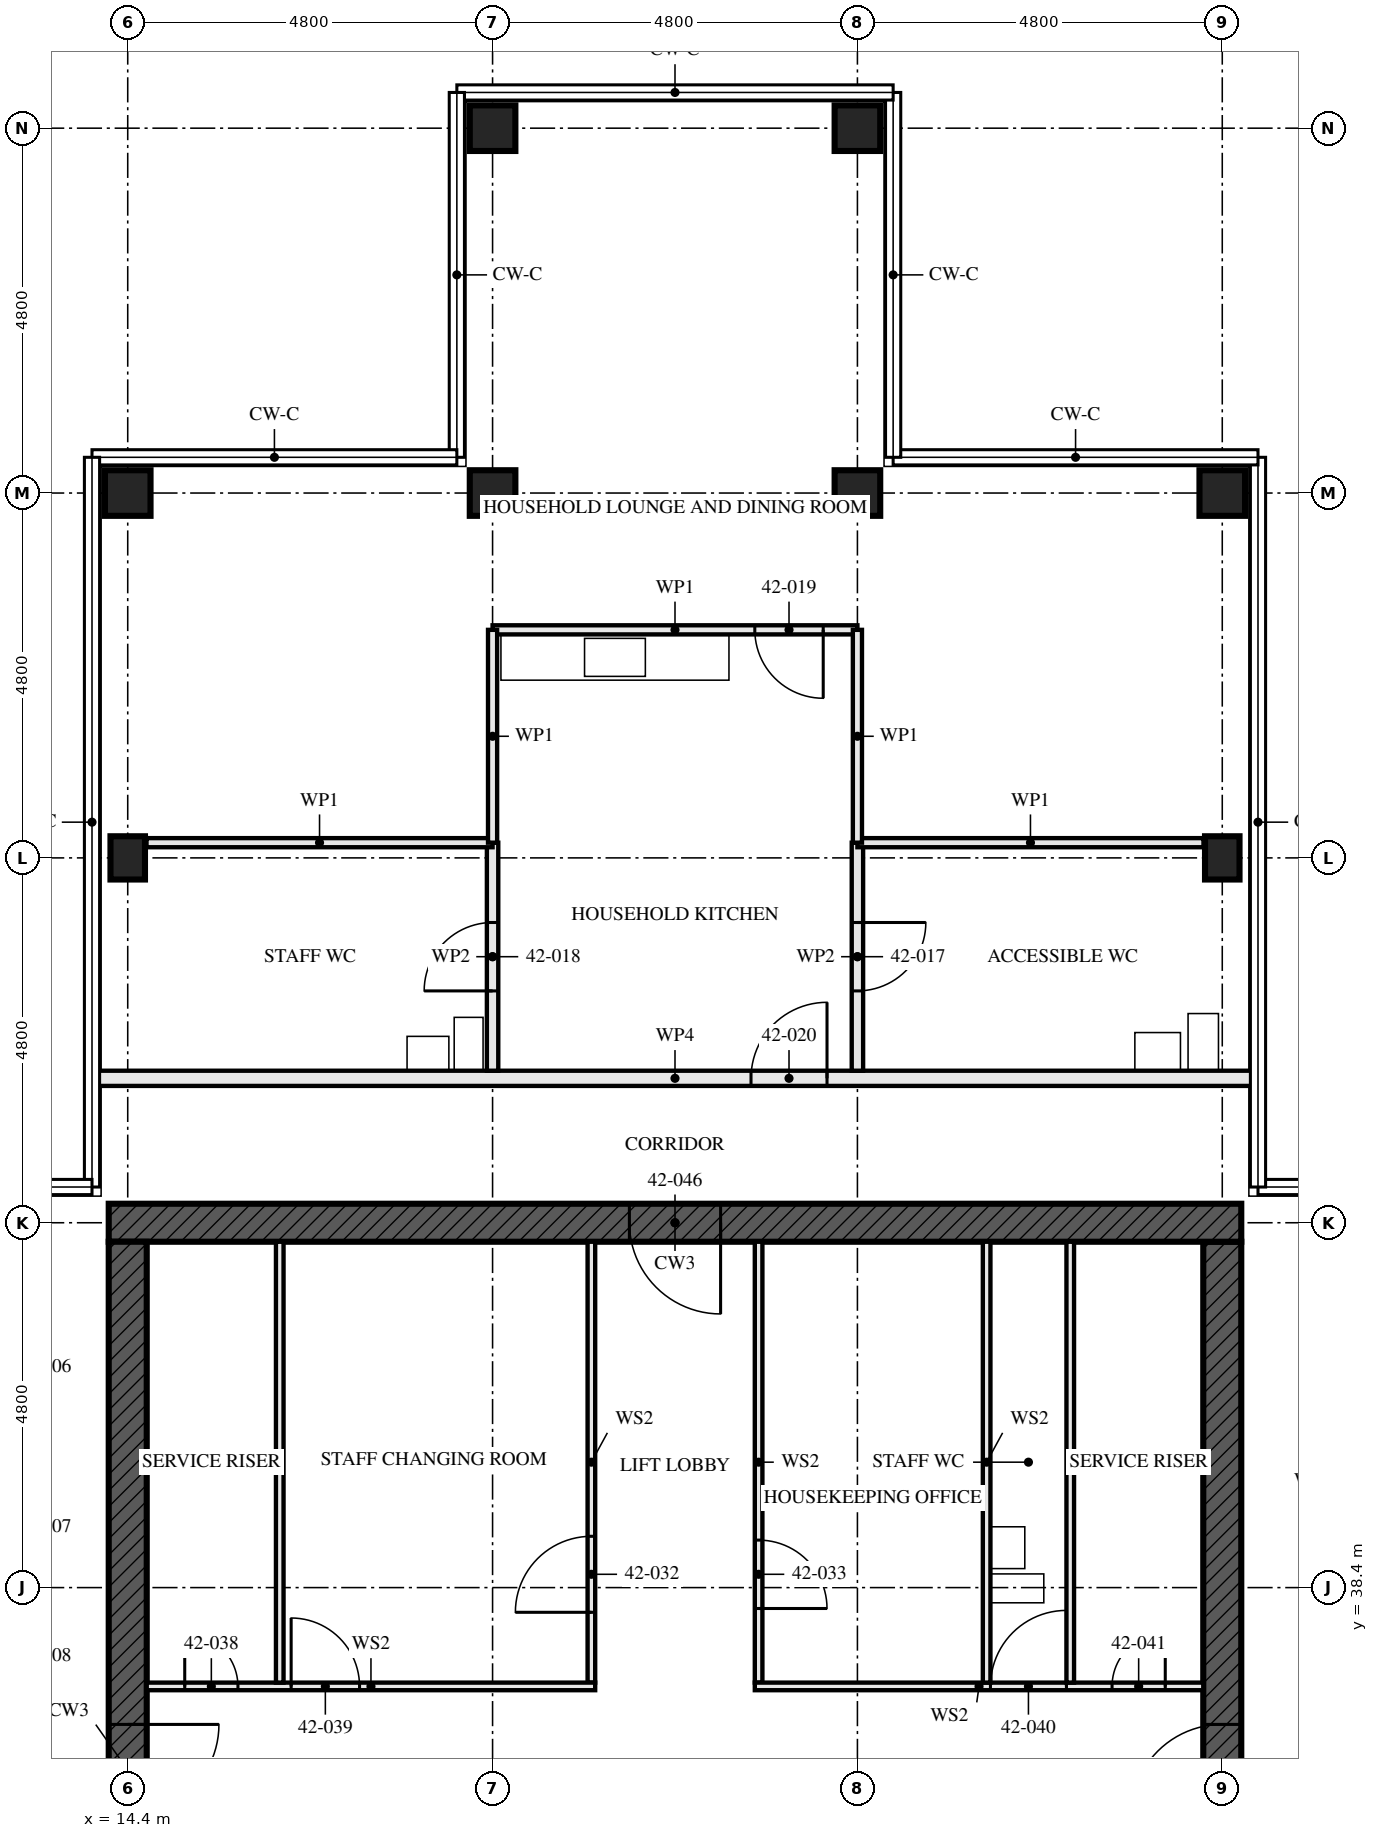
"""IFC4 building model, lengths in metres.
Left out: names, types, materials, properties, quantities, classifications, styles, units other than length and angle.
Written with IfcOpenShell. Run it as: python <this file> out.ifc"""

import sys

from ifc_helpers import new_model, si_unit, direction, frame, frame_2d, origin, origin_2d, place, context, subcontext, project, spatial, rectangle, hollow_rectangle, i_section, extrude, element, fill, save


model = new_model("IFC4")
c1 = context("Model", 3, precision=1e-05, world=origin(), true_north=direction((0.0, 1.0)))
c2 = subcontext(c1, "Body", "Model", "MODEL_VIEW")
j1 = project(units=[si_unit("LENGTHUNIT", "METRE"), si_unit("PLANEANGLEUNIT", "RADIAN")], contexts=[c1])
p1 = place(None, origin())
s1 = spatial("IfcSite", under=j1, at=p1, CompositionType="ELEMENT")
p2 = place(p1, origin())
s2 = spatial("IfcBuilding", under=s1, at=p2, CompositionType="ELEMENT")
p3 = place(p2, frame((0.0, 0.0, 155.0)))
s3 = spatial("IfcBuildingStorey", under=s2, at=p3, CompositionType="ELEMENT", Elevation=155.0)
p4 = place(p3, frame((14.4, 48.0, 0.0), z_axis=(0.0, 0.0, 1.0), x_axis=(1.0, 0.0, 0.0)))
e1 = element("IfcColumn", 1, at=p4, inside=s3, PredefinedType="COLUMN", context=c2, shape_type="SweptSolid", body=[
    extrude(i_section(OverallWidth=0.454, OverallDepth=0.569, WebThickness=0.078, FlangeThickness=0.125, FilletRadius=0.015, at=origin_2d()), origin(), (0.0, 0.0, 1.0), 3.5),
])
for number, where, z_axis, x_axis in (
    (2, (14.4, 52.8, 0.0), (0.0, 0.0, 1.0), (0.0, 1.0, 0.0)),
    (3, (19.2, 52.8, 0.0), (0.0, 0.0, 1.0), (0.0, 1.0, 0.0)),
    (4, (19.2, 57.6, 0.0), (0.0, 0.0, 1.0), (0.0, 1.0, 0.0)),
    (5, (24.0, 52.8, 0.0), (0.0, 0.0, 1.0), (0.0, 1.0, 0.0)),
    (6, (24.0, 57.6, 0.0), (0.0, 0.0, 1.0), (0.0, 1.0, 0.0)),
):
    element("IfcColumn", number, at=place(p3, frame(where, z_axis=z_axis, x_axis=x_axis)), inside=s3, PredefinedType="COLUMN", context=c2, shape_type="SweptSolid", body=[
        extrude(hollow_rectangle(XDim=0.6, YDim=0.6, WallThickness=0.05, at=origin_2d()), origin(), (0.0, 0.0, 1.0), 3.5),
    ])
p5 = place(p3, frame((28.8, 48.0, 0.0), z_axis=(0.0, 0.0, 1.0), x_axis=(1.0, 0.0, 0.0)))
e7 = element("IfcColumn", 7, at=p5, inside=s3, PredefinedType="COLUMN", context=c2, shape_type="SweptSolid", body=[
    extrude(i_section(OverallWidth=0.454, OverallDepth=0.569, WebThickness=0.078, FlangeThickness=0.125, FilletRadius=0.015, at=origin_2d()), origin(), (0.0, 0.0, 1.0), 3.5),
])
p6 = place(p3, frame((28.8, 52.8, 0.0), z_axis=(0.0, 0.0, 1.0), x_axis=(0.0, 1.0, 0.0)))
e8 = element("IfcColumn", 8, at=p6, inside=s3, PredefinedType="COLUMN", context=c2, shape_type="SweptSolid", body=[
    extrude(hollow_rectangle(XDim=0.6, YDim=0.6, WallThickness=0.05, at=origin_2d()), origin(), (0.0, 0.0, 1.0), 3.5),
])
p7 = place(p3, frame((29.05, 43.2, -0.17), z_axis=(0.0, 0.0, 1.0), x_axis=(-1.0, 0.0, 0.0)))
e9 = element("IfcWall", 9, at=p7, inside=s3, PredefinedType="SHEAR", context=c2, shape_type="SweptSolid", body=[
    extrude(rectangle(XDim=14.9, YDim=0.5, at=frame_2d((7.45, 0.0))), origin(), (0.0, 0.0, 1.0), 3.5),
])
p8 = place(p7, frame((6.85, 0.0, 0.17)))
e10 = element("IfcOpeningElement", 10, at=p8, cuts=e9, PredefinedType="OPENING", context=c2, shape_type="SweptSolid", body=[
    extrude(rectangle(XDim=1.2, YDim=2.1, at=frame_2d((0.6, 1.05))), frame((0.0, 0.26, 0.0), z_axis=(0.0, -1.0, 0.0), x_axis=(1.0, 0.0, 0.0)), (0.0, 0.0, 1.0), 0.521),
])
p9 = place(p3, frame((14.4, 42.95, -0.17), z_axis=(0.0, 0.0, 1.0), x_axis=(0.0, -1.0, 0.0)))
e11 = element("IfcWall", 11, at=p9, inside=s3, PredefinedType="SHEAR", context=c2, shape_type="SweptSolid", body=[
    extrude(rectangle(XDim=13.9, YDim=0.5, at=frame_2d((6.95, 0.0))), origin(), (0.0, 0.0, 1.0), 3.5),
])
p10 = place(p9, frame((6.35, 0.0, 0.17)))
e12 = element("IfcOpeningElement", 12, at=p10, cuts=e11, PredefinedType="OPENING", context=c2, shape_type="SweptSolid", body=[
    extrude(rectangle(XDim=1.2, YDim=2.1, at=frame_2d((0.6, 1.05))), frame((0.0, 0.26, 0.0), z_axis=(0.0, -1.0, 0.0), x_axis=(1.0, 0.0, 0.0)), (0.0, 0.0, 1.0), 0.521),
])
p11 = place(p3, frame((28.8, 29.05, -0.17), z_axis=(0.0, 0.0, 1.0), x_axis=(0.0, 1.0, 0.0)))
e13 = element("IfcWall", 13, at=p11, inside=s3, PredefinedType="SHEAR", context=c2, shape_type="SweptSolid", body=[
    extrude(rectangle(XDim=13.9, YDim=0.5, at=frame_2d((6.95, 0.0))), origin(), (0.0, 0.0, 1.0), 3.5),
])
p12 = place(p11, frame((6.35, 0.0, 0.17)))
e14 = element("IfcOpeningElement", 14, at=p12, cuts=e13, PredefinedType="OPENING", context=c2, shape_type="SweptSolid", body=[
    extrude(rectangle(XDim=1.2, YDim=2.1, at=frame_2d((0.6, 1.05))), frame((0.0, 0.26, 0.0), z_axis=(0.0, -1.0, 0.0), x_axis=(1.0, 0.0, 0.0)), (0.0, 0.0, 1.0), 0.521),
])
p13 = place(p3, frame((24.0, 48.2, 0.0), z_axis=(0.0, 0.0, 1.0), x_axis=(0.0, -1.0, 0.0)))
e15 = element("IfcWall", 15, at=p13, inside=s3, PredefinedType="PARTITIONING", context=c2, shape_type="SweptSolid", body=[
    extrude(rectangle(XDim=3.0, YDim=0.15, at=frame_2d((1.5, 0.0))), origin(), (0.0, 0.0, 1.0), 2.55),
])
p14 = place(p13, frame((1.05, 0.0, 0.0)))
e16 = element("IfcOpeningElement", 16, at=p14, cuts=e15, PredefinedType="OPENING", context=c2, shape_type="SweptSolid", body=[
    extrude(rectangle(XDim=0.9, YDim=2.1, at=frame_2d((0.45, 1.05))), frame((0.0, 0.085, 0.0), z_axis=(0.0, -1.0, 0.0), x_axis=(1.0, 0.0, 0.0)), (0.0, 0.0, 1.0), 0.171),
])
p15 = place(p3, frame((19.2, 48.2, 0.0), z_axis=(0.0, 0.0, 1.0), x_axis=(0.0, -1.0, 0.0)))
e17 = element("IfcWall", 17, at=p15, inside=s3, PredefinedType="PARTITIONING", context=c2, shape_type="SweptSolid", body=[
    extrude(rectangle(XDim=3.0, YDim=0.15, at=frame_2d((1.5, 0.0))), origin(), (0.0, 0.0, 1.0), 2.55),
])
p16 = place(p15, frame((1.05, 0.0, 0.0)))
e18 = element("IfcOpeningElement", 18, at=p16, cuts=e17, PredefinedType="OPENING", context=c2, shape_type="SweptSolid", body=[
    extrude(rectangle(XDim=0.9, YDim=2.1, at=frame_2d((0.45, 1.05))), frame((0.0, 0.085, 0.0), z_axis=(0.0, -1.0, 0.0), x_axis=(1.0, 0.0, 0.0)), (0.0, 0.0, 1.0), 0.171),
])
p17 = place(p3, frame((28.553, 48.2, 0.0), z_axis=(0.0, 0.0, 1.0), x_axis=(-1.0, 0.0, 0.0)))
e19 = element("IfcWall", 19, at=p17, inside=s3, PredefinedType="PARTITIONING", context=c2, shape_type="SweptSolid", body=[
    extrude(rectangle(XDim=4.553, YDim=0.12, at=frame_2d((2.276, 0.0))), origin(), (0.0, 0.0, 1.0), 3.33),
])
p18 = place(p3, frame((24.0, 51.0, 0.0), z_axis=(0.0, 0.0, 1.0), x_axis=(-1.0, 0.0, 0.0)))
e20 = element("IfcWall", 20, at=p18, inside=s3, PredefinedType="PARTITIONING", context=c2, shape_type="SweptSolid", body=[
    extrude(rectangle(XDim=4.8, YDim=0.12, at=frame_2d((2.4, 0.0))), origin(), (0.0, 0.0, 1.0), 3.33),
])
p19 = place(p18, frame((0.45, 0.0, 0.0)))
e21 = element("IfcOpeningElement", 21, at=p19, cuts=e20, PredefinedType="OPENING", context=c2, shape_type="SweptSolid", body=[
    extrude(rectangle(XDim=0.9, YDim=2.1, at=frame_2d((0.45, 1.05))), frame((0.0, 0.071, 0.0), z_axis=(0.0, -1.0, 0.0), x_axis=(1.0, 0.0, 0.0)), (0.0, 0.0, 1.0), 0.141),
])
p20 = place(p3, frame((19.2, 48.2, 0.0), z_axis=(0.0, 0.0, 1.0), x_axis=(-1.0, 0.0, 0.0)))
e22 = element("IfcWall", 22, at=p20, inside=s3, PredefinedType="PARTITIONING", context=c2, shape_type="SweptSolid", body=[
    extrude(rectangle(XDim=4.553, YDim=0.12, at=frame_2d((2.276, 0.0))), origin(), (0.0, 0.0, 1.0), 3.33),
])
for number, where, z_axis, x_axis in (
    (23, (24.0, 51.0, 0.0), (0.0, 0.0, 1.0), (0.0, -1.0, 0.0)),
    (24, (19.2, 51.0, 0.0), (0.0, 0.0, 1.0), (0.0, -1.0, 0.0)),
):
    element("IfcWall", number, at=place(p3, frame(where, z_axis=z_axis, x_axis=x_axis)), inside=s3, PredefinedType="PARTITIONING", context=c2, shape_type="SweptSolid", body=[
        extrude(rectangle(XDim=2.8, YDim=0.12, at=frame_2d((1.4, 0.0))), origin(), (0.0, 0.0, 1.0), 3.33),
    ])
p21 = place(p3, frame((29.25, 45.1, 0.0), z_axis=(0.0, 0.0, 1.0), x_axis=(-1.0, 0.0, 0.0)))
e25 = element("IfcWall", 25, at=p21, inside=s3, PredefinedType="PARTITIONING", context=c2, shape_type="SweptSolid", body=[
    extrude(rectangle(XDim=15.3, YDim=0.2, at=frame_2d((7.65, 0.0))), origin(), (0.0, 0.0, 1.0), 2.32),
])
p22 = place(p21, frame((5.65, 0.0, 0.0)))
e26 = element("IfcOpeningElement", 26, at=p22, cuts=e25, PredefinedType="OPENING", context=c2, shape_type="SweptSolid", body=[
    extrude(rectangle(XDim=1.0, YDim=2.1, at=frame_2d((0.5, 1.05))), frame((0.0, 0.111, 0.0), z_axis=(0.0, -1.0, 0.0), x_axis=(1.0, 0.0, 0.0)), (0.0, 0.0, 1.0), 0.221),
])
for number, where, z_axis, x_axis in (
    (27, (16.4, 37.15, 0.0), (0.0, 0.0, 1.0), (0.0, 1.0, 0.0)),
    (28, (26.8, 37.15, 0.0), (0.0, 0.0, 1.0), (0.0, 1.0, 0.0)),
):
    element("IfcWall", number, at=place(p3, frame(where, z_axis=z_axis, x_axis=x_axis)), inside=s3, PredefinedType="SOLIDWALL", context=c2, shape_type="SweptSolid", body=[
        extrude(rectangle(XDim=5.8, YDim=0.1, at=frame_2d((2.9, 0.0))), origin(), (0.0, 0.0, 1.0), 3.33),
    ])
p23 = place(p3, frame((20.5, 37.15, 0.0), z_axis=(0.0, 0.0, 1.0), x_axis=(0.0, 1.0, 0.0)))
e29 = element("IfcWall", 29, at=p23, inside=s3, PredefinedType="SOLIDWALL", context=c2, shape_type="SweptSolid", body=[
    extrude(rectangle(XDim=5.8, YDim=0.1, at=frame_2d((2.9, 0.0))), origin(), (0.0, 0.0, 1.0), 3.33),
])
p24 = place(p23, frame((0.925, 0.0, 0.0)))
e30 = element("IfcOpeningElement", 30, at=p24, cuts=e29, PredefinedType="OPENING", context=c2, shape_type="SweptSolid", body=[
    extrude(rectangle(XDim=1.0, YDim=2.1, at=frame_2d((0.5, 1.05))), frame((0.0, 0.061, 0.0), z_axis=(0.0, -1.0, 0.0), x_axis=(1.0, 0.0, 0.0)), (0.0, 0.0, 1.0), 0.121),
])
p25 = place(p3, frame((22.7, 37.15, 0.0), z_axis=(0.0, 0.0, 1.0), x_axis=(0.0, 1.0, 0.0)))
e31 = element("IfcWall", 31, at=p25, inside=s3, PredefinedType="SOLIDWALL", context=c2, shape_type="SweptSolid", body=[
    extrude(rectangle(XDim=5.8, YDim=0.1, at=frame_2d((2.9, 0.0))), origin(), (0.0, 0.0, 1.0), 3.33),
])
p26 = place(p25, frame((0.975, 0.0, 0.0)))
e32 = element("IfcOpeningElement", 32, at=p26, cuts=e31, PredefinedType="OPENING", context=c2, shape_type="SweptSolid", body=[
    extrude(rectangle(XDim=0.9, YDim=2.1, at=frame_2d((0.45, 1.05))), frame((0.0, 0.061, 0.0), z_axis=(0.0, -1.0, 0.0), x_axis=(1.0, 0.0, 0.0)), (0.0, 0.0, 1.0), 0.121),
])
p27 = place(p3, frame((14.65, 37.1, 0.0), z_axis=(0.0, 0.0, 1.0), x_axis=(1.0, 0.0, 0.0)))
e33 = element("IfcWall", 33, at=p27, inside=s3, PredefinedType="SOLIDWALL", context=c2, shape_type="SweptSolid", body=[
    extrude(rectangle(XDim=5.9, YDim=0.1, at=frame_2d((2.95, 0.0))), origin(), (0.0, 0.0, 1.0), 3.33),
])
p28 = place(p27, frame((0.5, 0.0, 0.0)))
e34 = element("IfcOpeningElement", 34, at=p28, cuts=e33, PredefinedType="OPENING", context=c2, shape_type="SweptSolid", body=[
    extrude(rectangle(XDim=0.7, YDim=2.1, at=frame_2d((0.35, 1.05))), frame((0.0, 0.061, 0.0), z_axis=(0.0, -1.0, 0.0), x_axis=(1.0, 0.0, 0.0)), (0.0, 0.0, 1.0), 0.121),
])
p29 = place(p27, frame((1.9, 0.0, 0.0)))
e35 = element("IfcOpeningElement", 35, at=p29, cuts=e33, PredefinedType="OPENING", context=c2, shape_type="SweptSolid", body=[
    extrude(rectangle(XDim=0.9, YDim=2.1, at=frame_2d((0.45, 1.05))), frame((0.0, 0.061, 0.0), z_axis=(0.0, -1.0, 0.0), x_axis=(1.0, 0.0, 0.0)), (0.0, 0.0, 1.0), 0.121),
])
p30 = place(p3, frame((22.65, 37.1, 0.0), z_axis=(0.0, 0.0, 1.0), x_axis=(1.0, 0.0, 0.0)))
e36 = element("IfcWall", 36, at=p30, inside=s3, PredefinedType="SOLIDWALL", context=c2, shape_type="SweptSolid", body=[
    extrude(rectangle(XDim=5.9, YDim=0.1, at=frame_2d((2.95, 0.0))), origin(), (0.0, 0.0, 1.0), 3.33),
])
p31 = place(p30, frame((3.1, 0.0, 0.0)))
e37 = element("IfcOpeningElement", 37, at=p31, cuts=e36, PredefinedType="OPENING", context=c2, shape_type="SweptSolid", body=[
    extrude(rectangle(XDim=1.0, YDim=2.1, at=frame_2d((0.5, 1.05))), frame((0.0, 0.061, 0.0), z_axis=(0.0, -1.0, 0.0), x_axis=(1.0, 0.0, 0.0)), (0.0, 0.0, 1.0), 0.121),
])
p32 = place(p30, frame((4.7, 0.0, 0.0)))
e38 = element("IfcOpeningElement", 38, at=p32, cuts=e36, PredefinedType="OPENING", context=c2, shape_type="SweptSolid", body=[
    extrude(rectangle(XDim=0.7, YDim=2.1, at=frame_2d((0.35, 1.05))), frame((0.0, 0.061, 0.0), z_axis=(0.0, -1.0, 0.0), x_axis=(1.0, 0.0, 0.0)), (0.0, 0.0, 1.0), 0.121),
])
p33 = place(p3, frame((25.7, 37.15, 0.0), z_axis=(0.0, 0.0, 1.0), x_axis=(0.0, 1.0, 0.0)))
e39 = element("IfcWall", 39, at=p33, inside=s3, PredefinedType="SOLIDWALL", context=c2, shape_type="SweptSolid", body=[
    extrude(rectangle(XDim=5.8, YDim=0.1, at=frame_2d((2.9, 0.0))), origin(), (0.0, 0.0, 1.0), 3.33),
])
p34 = place(p14, origin())
e40 = element("IfcDoor", 40, at=p34, inside=s3, OperationType="SINGLE_SWING_RIGHT", PredefinedType="DOOR", context=c2, shape_type="SweptSolid", body=[
    extrude(rectangle(XDim=0.9, YDim=2.1, at=frame_2d((0.45, 1.05))), frame((0.0, 0.022, 0.0), z_axis=(0.0, -1.0, 0.0), x_axis=(1.0, 0.0, 0.0)), (0.0, 0.0, 1.0), 0.044),
])
fill(e16, e40)
p35 = place(p16, frame((0.9, 0.0, 0.0), z_axis=(0.0, 0.0, 1.0), x_axis=(-1.0, 0.0, 0.0)))
e41 = element("IfcDoor", 41, at=p35, inside=s3, OperationType="SINGLE_SWING_RIGHT", PredefinedType="DOOR", context=c2, shape_type="SweptSolid", body=[
    extrude(rectangle(XDim=0.9, YDim=2.1, at=frame_2d((0.45, 1.05))), frame((0.0, 0.022, 0.0), z_axis=(0.0, -1.0, 0.0), x_axis=(1.0, 0.0, 0.0)), (0.0, 0.0, 1.0), 0.044),
])
fill(e18, e41)
p36 = place(p19, origin())
e42 = element("IfcDoor", 42, at=p36, inside=s3, OperationType="SINGLE_SWING_RIGHT", PredefinedType="DOOR", context=c2, shape_type="SweptSolid", body=[
    extrude(rectangle(XDim=0.9, YDim=2.1, at=frame_2d((0.45, 1.05))), frame((0.0, 0.022, 0.0), z_axis=(0.0, -1.0, 0.0), x_axis=(1.0, 0.0, 0.0)), (0.0, 0.0, 1.0), 0.044),
])
fill(e21, e42)
p37 = place(p22, frame((1.0, 0.0, 0.0), z_axis=(0.0, 0.0, 1.0), x_axis=(-1.0, 0.0, 0.0)))
e43 = element("IfcDoor", 43, at=p37, inside=s3, OperationType="SINGLE_SWING_LEFT", PredefinedType="DOOR", context=c2, shape_type="SweptSolid", body=[
    extrude(rectangle(XDim=1.0, YDim=2.1, at=frame_2d((0.5, 1.05))), frame((0.0, 0.027, 0.0), z_axis=(0.0, -1.0, 0.0), x_axis=(1.0, 0.0, 0.0)), (0.0, 0.0, 1.0), 0.054),
])
fill(e26, e43)
p38 = place(p24, origin())
e44 = element("IfcDoor", 44, at=p38, inside=s3, OperationType="SINGLE_SWING_RIGHT", PredefinedType="DOOR", context=c2, shape_type="SweptSolid", body=[
    extrude(rectangle(XDim=1.0, YDim=2.1, at=frame_2d((0.5, 1.05))), frame((0.0, 0.027, 0.0), z_axis=(0.0, -1.0, 0.0), x_axis=(1.0, 0.0, 0.0)), (0.0, 0.0, 1.0), 0.054),
])
fill(e30, e44)
p39 = place(p26, frame((0.9, 0.0, 0.0), z_axis=(0.0, 0.0, 1.0), x_axis=(-1.0, 0.0, 0.0)))
e45 = element("IfcDoor", 45, at=p39, inside=s3, OperationType="SINGLE_SWING_LEFT", PredefinedType="DOOR", context=c2, shape_type="SweptSolid", body=[
    extrude(rectangle(XDim=0.9, YDim=2.1, at=frame_2d((0.45, 1.05))), frame((0.0, 0.027, 0.0), z_axis=(0.0, -1.0, 0.0), x_axis=(1.0, 0.0, 0.0)), (0.0, 0.0, 1.0), 0.054),
])
fill(e32, e45)
p40 = place(p28, origin())
e46 = element("IfcDoor", 46, at=p40, inside=s3, OperationType="SINGLE_SWING_RIGHT", PredefinedType="DOOR", context=c2, shape_type="SweptSolid", body=[
    extrude(rectangle(XDim=0.7, YDim=2.1, at=frame_2d((0.35, 1.05))), frame((0.0, 0.027, 0.0), z_axis=(0.0, -1.0, 0.0), x_axis=(1.0, 0.0, 0.0)), (0.0, 0.0, 1.0), 0.054),
])
fill(e34, e46)
p41 = place(p29, origin())
e47 = element("IfcDoor", 47, at=p41, inside=s3, OperationType="SINGLE_SWING_RIGHT", PredefinedType="DOOR", context=c2, shape_type="SweptSolid", body=[
    extrude(rectangle(XDim=0.9, YDim=2.1, at=frame_2d((0.45, 1.05))), frame((0.0, 0.027, 0.0), z_axis=(0.0, -1.0, 0.0), x_axis=(1.0, 0.0, 0.0)), (0.0, 0.0, 1.0), 0.054),
])
fill(e35, e47)
p42 = place(p31, origin())
e48 = element("IfcDoor", 48, at=p42, inside=s3, OperationType="SINGLE_SWING_LEFT", PredefinedType="DOOR", context=c2, shape_type="SweptSolid", body=[
    extrude(rectangle(XDim=1.0, YDim=2.1, at=frame_2d((0.5, 1.05))), frame((0.0, 0.027, 0.0), z_axis=(0.0, -1.0, 0.0), x_axis=(1.0, 0.0, 0.0)), (0.0, 0.0, 1.0), 0.054),
])
fill(e37, e48)
p43 = place(p32, origin())
e49 = element("IfcDoor", 49, at=p43, inside=s3, OperationType="SINGLE_SWING_LEFT", PredefinedType="DOOR", context=c2, shape_type="SweptSolid", body=[
    extrude(rectangle(XDim=0.7, YDim=2.1, at=frame_2d((0.35, 1.05))), frame((0.0, 0.027, 0.0), z_axis=(0.0, -1.0, 0.0), x_axis=(1.0, 0.0, 0.0)), (0.0, 0.0, 1.0), 0.054),
])
fill(e38, e49)
p44 = place(p10, origin())
e50 = element("IfcDoor", 50, at=p44, inside=s3, OperationType="SINGLE_SWING_LEFT", PredefinedType="DOOR", context=c2, shape_type="SweptSolid", body=[
    extrude(rectangle(XDim=1.2, YDim=2.1, at=frame_2d((0.6, 1.05))), frame((0.0, 0.027, 0.0), z_axis=(0.0, -1.0, 0.0), x_axis=(1.0, 0.0, 0.0)), (0.0, 0.0, 1.0), 0.054),
])
fill(e12, e50)
p45 = place(p12, origin())
e51 = element("IfcDoor", 51, at=p45, inside=s3, OperationType="SINGLE_SWING_LEFT", PredefinedType="DOOR", context=c2, shape_type="SweptSolid", body=[
    extrude(rectangle(XDim=1.2, YDim=2.1, at=frame_2d((0.6, 1.05))), frame((0.0, 0.027, 0.0), z_axis=(0.0, -1.0, 0.0), x_axis=(1.0, 0.0, 0.0)), (0.0, 0.0, 1.0), 0.054),
])
fill(e14, e51)
p46 = place(p8, origin())
e52 = element("IfcDoor", 52, at=p46, inside=s3, OperationType="SINGLE_SWING_LEFT", PredefinedType="DOOR", context=c2, shape_type="SweptSolid", body=[
    extrude(rectangle(XDim=1.2, YDim=2.1, at=frame_2d((0.6, 1.05))), frame((0.0, 0.027, 0.0), z_axis=(0.0, -1.0, 0.0), x_axis=(1.0, 0.0, 0.0)), (0.0, 0.0, 1.0), 0.054),
])
fill(e10, e52)
save(model, sys.argv[1])
